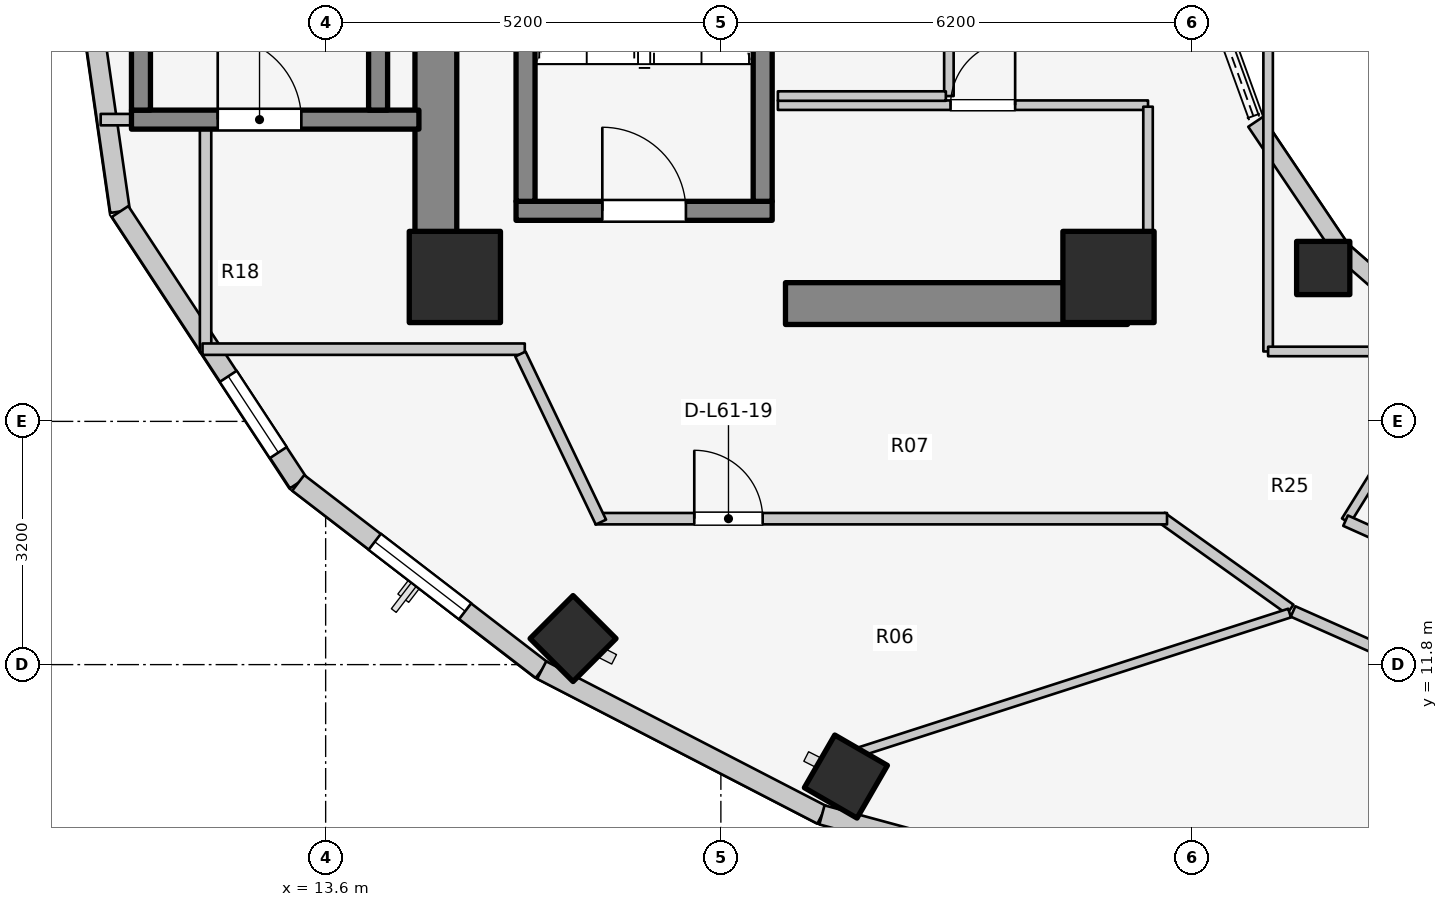
"""IFC4 building model, lengths in metres.
Left out: names, types, materials, properties, quantities, classifications, styles, units other than length and angle.
Written with IfcOpenShell. Run it as: python <this file> out.ifc"""

import sys

from ifc_helpers import new_model, si_unit, direction, frame, frame_2d, origin, origin_2d, place, context, subcontext, project, spatial, rectangle, extrude, element, fill, save


model = new_model("IFC4")
c1 = context("Model", 3, precision=1e-05, world=origin(), true_north=direction((0.0, 1.0)))
c2 = subcontext(c1, "Body", "Model", "MODEL_VIEW")
j1 = project(units=[si_unit("LENGTHUNIT", "METRE"), si_unit("PLANEANGLEUNIT", "RADIAN")], contexts=[c1])
p1 = place(None, origin())
s1 = spatial("IfcSite", under=j1, at=p1, CompositionType="ELEMENT")
p2 = place(p1, origin())
s2 = spatial("IfcBuilding", under=s1, at=p2, CompositionType="ELEMENT")
p3 = place(p2, frame((0.0, 0.0, 201.6)))
s3 = spatial("IfcBuildingStorey", under=s2, at=p3, CompositionType="ELEMENT", Elevation=201.6)
p4 = place(p3, frame((15.05, 17.05, 0.0), z_axis=(0.0, 0.0, 1.0), x_axis=(0.0, 1.0, 0.0)))
e1 = element("IfcWall", 1, at=p4, inside=s3, PredefinedType="SHEAR", context=c2, shape_type="SweptSolid", body=[
    extrude(rectangle(XDim=12.8, YDim=0.55, at=frame_2d((6.4, 0.0))), origin(), (0.0, 0.0, 1.0), 3.1),
])
p5 = place(p3, frame((19.65, 16.55, 0.0), z_axis=(0.0, 0.0, 1.0), x_axis=(1.0, 0.0, 0.0)))
e2 = element("IfcWall", 2, at=p5, inside=s3, PredefinedType="SHEAR", context=c2, shape_type="SweptSolid", body=[
    extrude(rectangle(XDim=4.5, YDim=0.55, at=frame_2d((2.25, 0.0))), origin(), (0.0, 0.0, 1.0), 3.1),
])
p6 = place(p3, frame((16.105, 17.77, 0.0), z_axis=(0.0, 0.0, 1.0), x_axis=(1.0, 0.0, 0.0)))
e3 = element("IfcWall", 3, at=p6, inside=s3, PredefinedType="SOLIDWALL", context=c2, shape_type="SweptSolid", body=[
    extrude(rectangle(XDim=3.37, YDim=0.25, at=frame_2d((1.685, 0.0))), origin(), (0.0, 0.0, 1.0), 3.1),
])
p7 = place(p6, frame((1.135, 0.0, 0.0)))
e4 = element("IfcOpeningElement", 4, at=p7, cuts=e3, PredefinedType="OPENING", context=c2, shape_type="SweptSolid", body=[
    extrude(rectangle(XDim=1.1, YDim=2.1, at=frame_2d((0.55, 1.05))), frame((0.0, 0.135, 0.0), z_axis=(0.0, -1.0, 0.0), x_axis=(1.0, 0.0, 0.0)), (0.0, 0.0, 1.0), 0.27),
])
for number, where, z_axis, x_axis in (
    (5, (16.23, 17.895, 0.0), (0.0, 0.0, 1.0), (0.0, 1.0, 0.0)),
    (6, (19.35, 17.895, 0.0), (0.0, 0.0, 1.0), (0.0, 1.0, 0.0)),
):
    element("IfcWall", number, at=place(p3, frame(where, z_axis=z_axis, x_axis=x_axis)), inside=s3, PredefinedType="SOLIDWALL", context=c2, shape_type="SweptSolid", body=[
        extrude(rectangle(XDim=7.81, YDim=0.25, at=frame_2d((3.905, 0.0))), origin(), (0.0, 0.0, 1.0), 3.1),
    ])
p8 = place(p3, frame((11.045, 18.97, 0.0), z_axis=(0.0, 0.0, 1.0), x_axis=(1.0, 0.0, 0.0)))
e7 = element("IfcWall", 7, at=p8, inside=s3, PredefinedType="SOLIDWALL", context=c2, shape_type="SweptSolid", body=[
    extrude(rectangle(XDim=3.782, YDim=0.25, at=frame_2d((1.891, 0.0))), origin(), (0.0, 0.0, 1.0), 3.1),
])
p9 = place(p8, frame((1.135, 0.0, 0.0)))
e8 = element("IfcOpeningElement", 8, at=p9, cuts=e7, PredefinedType="OPENING", context=c2, shape_type="SweptSolid", body=[
    extrude(rectangle(XDim=1.1, YDim=2.1, at=frame_2d((0.55, 1.05))), frame((0.0, 0.135, 0.0), z_axis=(0.0, -1.0, 0.0), x_axis=(1.0, 0.0, 0.0)), (0.0, 0.0, 1.0), 0.27),
])
for number, where, z_axis, x_axis in (
    (9, (11.17, 19.095, 0.0), (0.0, 0.0, 1.0), (0.0, 1.0, 0.0)),
    (10, (14.29, 19.095, 0.0), (0.0, 0.0, 1.0), (0.0, 1.0, 0.0)),
):
    element("IfcWall", number, at=place(p3, frame(where, z_axis=z_axis, x_axis=x_axis)), inside=s3, PredefinedType="SOLIDWALL", context=c2, shape_type="SweptSolid", body=[
        extrude(rectangle(XDim=7.81, YDim=0.25, at=frame_2d((3.905, 0.0))), origin(), (0.0, 0.0, 1.0), 3.1),
    ])
for number, where, z_axis, x_axis in (
    (11, (15.3, 16.9, 0.0), (0.0, 0.0, 1.0), (1.0, 0.0, 0.0)),
    (12, (23.9, 16.9, 0.0), (0.0, 0.0, 1.0), (1.0, 0.0, 0.0)),
):
    element("IfcColumn", number, at=place(p3, frame(where, z_axis=z_axis, x_axis=x_axis)), inside=s3, PredefinedType="COLUMN", context=c2, shape_type="SweptSolid", body=[
        extrude(rectangle(XDim=1.2, YDim=1.2, at=origin_2d()), origin(), (0.0, 0.0, 1.0), 3.1),
    ])
p10 = place(p3, frame((26.725, 17.018, 0.0), z_axis=(0.0, 0.0, 1.0), x_axis=(1.0, 0.0, 0.0)))
e13 = element("IfcColumn", 13, at=p10, inside=s3, PredefinedType="COLUMN", context=c2, shape_type="SweptSolid", body=[
    extrude(rectangle(XDim=0.7, YDim=0.7, at=origin_2d()), origin(), (0.0, 0.0, 1.0), 3.1),
])
for number, where, z_axis, x_axis in (
    (14, (16.855, 12.143, 0.0), (0.0, 0.0, 1.0), (-0.707, -0.707, 0.0)),
    (15, (20.445, 10.327, 0.0), (0.0, 0.0, 1.0), (-0.5, -0.866, 0.0)),
):
    element("IfcColumn", number, at=place(p3, frame(where, z_axis=z_axis, x_axis=x_axis)), inside=s3, PredefinedType="COLUMN", context=c2, shape_type="SweptSolid", body=[
        extrude(rectangle(XDim=0.8, YDim=0.8, at=origin_2d()), origin(), (0.0, 0.0, 1.0), 3.1),
    ])
p11 = place(p3, frame((25.834, 18.94, 0.0), z_axis=(0.0, 0.0, 1.0), x_axis=(0.558197800898, -0.829707909492, 0.0)))
e16 = element("IfcWall", 16, at=p11, inside=s3, PredefinedType="STANDARD", context=c2, shape_type="SweptSolid", body=[
    extrude(rectangle(XDim=2.027, YDim=0.23, at=frame_2d((1.013, 0.0))), origin(), (0.0, 0.0, 1.0), 2.16),
])
p12 = place(p3, frame((26.965, 17.258, 0.0), z_axis=(0.0, 0.0, 1.0), x_axis=(0.752576694707, -0.658504607869, 0.0)))
e17 = element("IfcWall", 17, at=p12, inside=s3, PredefinedType="STANDARD", context=c2, shape_type="SweptSolid", body=[
    extrude(rectangle(XDim=1.959, YDim=0.23, at=frame_2d((0.98, 0.0))), origin(), (0.0, 0.0, 1.0), 2.16),
])
p13 = place(p3, frame((10.14, 23.0, 0.0), z_axis=(0.0, 0.0, 1.0), x_axis=(0.142712754019, -0.989764148593, 0.0)))
e18 = element("IfcWall", 18, at=p13, inside=s3, PredefinedType="STANDARD", context=c2, shape_type="SweptSolid", body=[
    extrude(rectangle(XDim=5.293, YDim=0.26, at=frame_2d((2.646, 0.0))), origin(), (0.0, 0.0, 1.0), 2.85),
])
p14 = place(p13, frame((1.458, 0.0, 0.75)))
e19 = element("IfcOpeningElement", 19, at=p14, cuts=e18, PredefinedType="OPENING", context=c2, shape_type="SweptSolid", body=[
    extrude(rectangle(XDim=1.2, YDim=1.5, at=frame_2d((0.6, 0.75))), frame((0.0, 0.14, 0.0), z_axis=(0.0, -1.0, 0.0), x_axis=(1.0, 0.0, 0.0)), (0.0, 0.0, 1.0), 0.28),
])
p15 = place(p3, frame((10.895, 17.761, 0.0), z_axis=(0.0, 0.0, 1.0), x_axis=(0.548776305075, -0.835969238064, 0.0)))
e20 = element("IfcWall", 20, at=p15, inside=s3, PredefinedType="STANDARD", context=c2, shape_type="SweptSolid", body=[
    extrude(rectangle(XDim=4.271, YDim=0.26, at=frame_2d((2.135, 0.0))), origin(), (0.0, 0.0, 1.0), 2.85),
])
p16 = place(p15, frame((2.594, 0.0, 0.75)))
e21 = element("IfcOpeningElement", 21, at=p16, cuts=e20, PredefinedType="OPENING", context=c2, shape_type="SweptSolid", body=[
    extrude(rectangle(XDim=1.2, YDim=1.5, at=frame_2d((0.6, 0.75))), frame((0.0, 0.14, 0.0), z_axis=(0.0, -1.0, 0.0), x_axis=(1.0, 0.0, 0.0)), (0.0, 0.0, 1.0), 0.28),
])
p17 = place(p3, frame((13.239, 14.191, 0.0), z_axis=(0.0, 0.0, 1.0), x_axis=(0.792713817907, -0.609593965603, 0.0)))
e22 = element("IfcWall", 22, at=p17, inside=s3, PredefinedType="STANDARD", context=c2, shape_type="SweptSolid", body=[
    extrude(rectangle(XDim=4.041, YDim=0.26, at=frame_2d((2.021, 0.0))), origin(), (0.0, 0.0, 1.0), 2.85),
])
p18 = place(p17, frame((1.271, 0.0, 0.75)))
e23 = element("IfcOpeningElement", 23, at=p18, cuts=e22, PredefinedType="OPENING", context=c2, shape_type="SweptSolid", body=[
    extrude(rectangle(XDim=1.5, YDim=1.6, at=frame_2d((0.75, 0.8))), frame((0.0, 0.14, 0.0), z_axis=(0.0, -1.0, 0.0), x_axis=(1.0, 0.0, 0.0)), (0.0, 0.0, 1.0), 0.28),
])
p19 = place(p3, frame((16.442, 11.728, 0.0), z_axis=(0.0, 0.0, 1.0), x_axis=(0.88849146803, -0.458893137057, 0.0)))
e24 = element("IfcWall", 24, at=p19, inside=s3, PredefinedType="STANDARD", context=c2, shape_type="SweptSolid", body=[
    extrude(rectangle(XDim=4.15, YDim=0.26, at=frame_2d((2.075, 0.0))), origin(), (0.0, 0.0, 1.0), 2.85),
])
p20 = place(p3, frame((20.13, 9.823, 0.0), z_axis=(0.0, 0.0, 1.0), x_axis=(0.965213026382, -0.261464746576, 0.0)))
e25 = element("IfcWall", 25, at=p20, inside=s3, PredefinedType="STANDARD", context=c2, shape_type="SweptSolid", body=[
    extrude(rectangle(XDim=5.001, YDim=0.26, at=frame_2d((2.5, 0.0))), origin(), (0.0, 0.0, 1.0), 2.85),
])
p21 = place(p20, frame((1.75, 0.0, 0.75)))
e26 = element("IfcOpeningElement", 26, at=p21, cuts=e25, PredefinedType="OPENING", context=c2, shape_type="SweptSolid", body=[
    extrude(rectangle(XDim=1.5, YDim=1.6, at=frame_2d((0.75, 0.8))), frame((0.0, 0.14, 0.0), z_axis=(0.0, -1.0, 0.0), x_axis=(1.0, 0.0, 0.0)), (0.0, 0.0, 1.0), 0.28),
])
p22 = place(p3, frame((19.55, 19.16, 0.0), z_axis=(0.0, 0.0, 1.0), x_axis=(1.0, 0.0, 0.0)))
e27 = element("IfcWall", 27, at=p22, inside=s3, PredefinedType="PARTITIONING", context=c2, shape_type="SweptSolid", body=[
    extrude(rectangle(XDim=4.87, YDim=0.125, at=frame_2d((2.435, 0.0))), origin(), (0.0, 0.0, 1.0), 2.12),
])
p23 = place(p22, frame((2.272, 0.0, 0.0)))
e28 = element("IfcOpeningElement", 28, at=p23, cuts=e27, PredefinedType="OPENING", context=c2, shape_type="SweptSolid", body=[
    extrude(rectangle(XDim=0.85, YDim=2.05, at=frame_2d((0.425, 1.025))), frame((0.0, 0.073, 0.0), z_axis=(0.0, -1.0, 0.0), x_axis=(1.0, 0.0, 0.0)), (0.0, 0.0, 1.0), 0.145),
])
p24 = place(p3, frame((24.42, 17.1, 0.0), z_axis=(0.0, 0.0, 1.0), x_axis=(0.0, 1.0, 0.0)))
e29 = element("IfcWall", 29, at=p24, inside=s3, PredefinedType="PARTITIONING", context=c2, shape_type="SweptSolid", body=[
    extrude(rectangle(XDim=2.04, YDim=0.125, at=frame_2d((1.02, 0.0))), origin(), (0.0, 0.0, 1.0), 2.232),
])
p25 = place(p3, frame((21.8, 19.28, 0.0), z_axis=(0.0, 0.0, 1.0), x_axis=(0.0, 1.0, 0.0)))
e30 = element("IfcWall", 30, at=p25, inside=s3, PredefinedType="PARTITIONING", context=c2, shape_type="SweptSolid", body=[
    extrude(rectangle(XDim=2.4, YDim=0.125, at=frame_2d((1.2, 0.0))), origin(), (0.0, 0.0, 1.0), 2.855),
])
p26 = place(p25, frame((0.7, 0.0, 0.0)))
e31 = element("IfcOpeningElement", 31, at=p26, cuts=e30, PredefinedType="OPENING", context=c2, shape_type="SweptSolid", body=[
    extrude(rectangle(XDim=0.85, YDim=2.05, at=frame_2d((0.425, 1.025))), frame((0.0, 0.073, 0.0), z_axis=(0.0, -1.0, 0.0), x_axis=(1.0, 0.0, 0.0)), (0.0, 0.0, 1.0), 0.145),
])
p27 = place(p3, frame((19.55, 19.28, 0.0), z_axis=(0.0, 0.0, 1.0), x_axis=(1.0, 0.0, 0.0)))
e32 = element("IfcWall", 32, at=p27, inside=s3, PredefinedType="PARTITIONING", context=c2, shape_type="SweptSolid", body=[
    extrude(rectangle(XDim=2.21, YDim=0.125, at=frame_2d((1.105, 0.0))), origin(), (0.0, 0.0, 1.0), 2.12),
])
p28 = place(p3, frame((28.45, 15.985, 0.0), z_axis=(0.0, 0.0, 1.0), x_axis=(-0.527527080983, -0.849538215049, 0.0)))
e33 = element("IfcWall", 33, at=p28, inside=s3, PredefinedType="PARTITIONING", context=c2, shape_type="SweptSolid", body=[
    extrude(rectangle(XDim=2.701, YDim=0.125, at=frame_2d((1.351, 0.0))), origin(), (0.0, 0.0, 1.0), 2.376),
])
p29 = place(p3, frame((27.019, 13.694, 0.0), z_axis=(0.0, 0.0, 1.0), x_axis=(0.912628408652, -0.408790151203, 0.0)))
e34 = element("IfcWall", 34, at=p29, inside=s3, PredefinedType="PARTITIONING", context=c2, shape_type="SweptSolid", body=[
    extrude(rectangle(XDim=2.638, YDim=0.15, at=frame_2d((1.319, 0.0))), origin(), (0.0, 0.0, 1.0), 2.376),
])
p30 = place(p3, frame((26.0, 15.92, 0.0), z_axis=(0.0, 0.0, 1.0), x_axis=(0.0, 1.0, 0.0)))
e35 = element("IfcWall", 35, at=p30, inside=s3, PredefinedType="PARTITIONING", context=c2, shape_type="SweptSolid", body=[
    extrude(rectangle(XDim=4.28, YDim=0.125, at=frame_2d((2.14, 0.0))), origin(), (0.0, 0.0, 1.0), 2.232),
])
p31 = place(p3, frame((26.0, 15.92, 0.0), z_axis=(0.0, 0.0, 1.0), x_axis=(1.0, 0.0, 0.0)))
e36 = element("IfcWall", 36, at=p31, inside=s3, PredefinedType="PARTITIONING", context=c2, shape_type="SweptSolid", body=[
    extrude(rectangle(XDim=2.6, YDim=0.125, at=frame_2d((1.3, 0.0))), origin(), (0.0, 0.0, 1.0), 2.232),
])
p32 = place(p3, frame((10.64, 18.97, 0.0), z_axis=(0.0, 0.0, 1.0), x_axis=(1.0, 0.0, 0.0)))
e37 = element("IfcWall", 37, at=p32, inside=s3, PredefinedType="PARTITIONING", context=c2, shape_type="SweptSolid", body=[
    extrude(rectangle(XDim=0.4, YDim=0.15, at=frame_2d((0.2, 0.0))), origin(), (0.0, 0.0, 1.0), 2.855),
])
p33 = place(p3, frame((12.02, 15.91, 0.0), z_axis=(0.0, 0.0, 1.0), x_axis=(0.0, 1.0, 0.0)))
e38 = element("IfcWall", 38, at=p33, inside=s3, PredefinedType="PARTITIONING", context=c2, shape_type="SweptSolid", body=[
    extrude(rectangle(XDim=2.93, YDim=0.15, at=frame_2d((1.465, 0.0))), origin(), (0.0, 0.0, 1.0), 2.855),
])
p34 = place(p3, frame((11.98, 15.95, 0.0), z_axis=(0.0, 0.0, 1.0), x_axis=(1.0, 0.0, 0.0)))
e39 = element("IfcWall", 39, at=p34, inside=s3, PredefinedType="PARTITIONING", context=c2, shape_type="SweptSolid", body=[
    extrude(rectangle(XDim=4.24, YDim=0.15, at=frame_2d((2.12, 0.0))), origin(), (0.0, 0.0, 1.0), 2.22),
])
p35 = place(p3, frame((26.29, 12.527, 0.0), z_axis=(0.0, 0.0, 1.0), x_axis=(-0.813780999276, 0.581171648669, 0.0)))
e40 = element("IfcWall", 40, at=p35, inside=s3, PredefinedType="PARTITIONING", context=c2, shape_type="SweptSolid", body=[
    extrude(rectangle(XDim=2.082, YDim=0.15, at=frame_2d((1.041, 0.0))), origin(), (0.0, 0.0, 1.0), 2.376),
])
p36 = place(p3, frame((17.15, 13.72, 0.0), z_axis=(0.0, 0.0, 1.0), x_axis=(1.0, 0.0, 0.0)))
e41 = element("IfcWall", 41, at=p36, inside=s3, PredefinedType="PARTITIONING", context=c2, shape_type="SweptSolid", body=[
    extrude(rectangle(XDim=7.52, YDim=0.15, at=frame_2d((3.76, 0.0))), origin(), (0.0, 0.0, 1.0), 2.376),
])
p37 = place(p36, frame((1.3, 0.0, 0.0)))
e42 = element("IfcOpeningElement", 42, at=p37, cuts=e41, PredefinedType="OPENING", context=c2, shape_type="SweptSolid", body=[
    extrude(rectangle(XDim=0.9, YDim=2.1, at=frame_2d((0.45, 1.05))), frame((0.0, 0.085, 0.0), z_axis=(0.0, -1.0, 0.0), x_axis=(1.0, 0.0, 0.0)), (0.0, 0.0, 1.0), 0.17),
])
p38 = place(p3, frame((17.222, 13.675, 0.0), z_axis=(0.0, 0.0, 1.0), x_axis=(-0.431973389813, 0.901886351207, 0.0)))
e43 = element("IfcWall", 43, at=p38, inside=s3, PredefinedType="PARTITIONING", context=c2, shape_type="SweptSolid", body=[
    extrude(rectangle(XDim=2.452, YDim=0.15, at=frame_2d((1.226, 0.0))), origin(), (0.0, 0.0, 1.0), 2.855),
])
p39 = place(p3, frame((26.283, 12.478, 0.0), z_axis=(0.0, 0.0, 1.0), x_axis=(-0.951711719757, -0.306993163568, 0.0)))
e44 = element("IfcWall", 44, at=p39, inside=s3, PredefinedType="MOVABLE", context=c2, shape_type="SweptSolid", body=[
    extrude(rectangle(XDim=5.934, YDim=0.12, at=frame_2d((2.967, 0.0))), origin(), (0.0, 0.0, 1.0), 2.376),
])
p40 = place(p3, frame((26.328, 12.499, 0.0), z_axis=(0.0, 0.0, 1.0), x_axis=(0.914043013008, -0.4056172708, 0.0)))
e45 = element("IfcWall", 45, at=p40, inside=s3, PredefinedType="PARTITIONING", context=c2, shape_type="SweptSolid", body=[
    extrude(rectangle(XDim=2.999, YDim=0.15, at=frame_2d((1.5, 0.0))), origin(), (0.0, 0.0, 1.0), 2.376),
])
p41 = place(p16, origin())
e46 = element("IfcWindow", 46, at=p41, inside=s3, PartitioningType="SINGLE_PANEL", PredefinedType="WINDOW", context=c2, shape_type="SweptSolid", body=[
    extrude(rectangle(XDim=1.2, YDim=1.5, at=frame_2d((0.6, 0.75))), frame((0.0, 0.03, 0.0), z_axis=(0.0, -1.0, 0.0), x_axis=(1.0, 0.0, 0.0)), (0.0, 0.0, 1.0), 0.06),
])
fill(e21, e46)
p42 = place(p18, origin())
e47 = element("IfcWindow", 47, at=p42, inside=s3, PartitioningType="SINGLE_PANEL", PredefinedType="WINDOW", context=c2, shape_type="SweptSolid", body=[
    extrude(rectangle(XDim=1.5, YDim=1.6, at=frame_2d((0.75, 0.8))), frame((0.0, 0.03, 0.0), z_axis=(0.0, -1.0, 0.0), x_axis=(1.0, 0.0, 0.0)), (0.0, 0.0, 1.0), 0.06),
])
fill(e23, e47)
p43 = place(p7, origin())
e48 = element("IfcDoor", 48, at=p43, inside=s3, OperationType="SINGLE_SWING_LEFT", PredefinedType="DOOR", context=c2, shape_type="SweptSolid", body=[
    extrude(rectangle(XDim=1.1, YDim=2.1, at=frame_2d((0.55, 1.05))), frame((0.0, 0.025, 0.0), z_axis=(0.0, -1.0, 0.0), x_axis=(1.0, 0.0, 0.0)), (0.0, 0.0, 1.0), 0.05),
])
fill(e4, e48)
p44 = place(p9, origin())
e49 = element("IfcDoor", 49, at=p44, inside=s3, OperationType="SINGLE_SWING_LEFT", PredefinedType="DOOR", context=c2, shape_type="SweptSolid", body=[
    extrude(rectangle(XDim=1.1, YDim=2.1, at=frame_2d((0.55, 1.05))), frame((0.0, 0.025, 0.0), z_axis=(0.0, -1.0, 0.0), x_axis=(1.0, 0.0, 0.0)), (0.0, 0.0, 1.0), 0.05),
])
fill(e8, e49)
p45 = place(p23, origin())
e50 = element("IfcDoor", 50, at=p45, inside=s3, OperationType="SINGLE_SWING_RIGHT", PredefinedType="DOOR", context=c2, shape_type="SweptSolid", body=[
    extrude(rectangle(XDim=0.85, YDim=2.05, at=frame_2d((0.425, 1.025))), frame((0.0, 0.025, 0.0), z_axis=(0.0, -1.0, 0.0), x_axis=(1.0, 0.0, 0.0)), (0.0, 0.0, 1.0), 0.05),
])
fill(e28, e50)
p46 = place(p37, origin())
e51 = element("IfcDoor", 51, at=p46, inside=s3, OperationType="SINGLE_SWING_LEFT", PredefinedType="DOOR", context=c2, shape_type="SweptSolid", body=[
    extrude(rectangle(XDim=0.9, YDim=2.1, at=frame_2d((0.45, 1.05))), frame((0.0, 0.025, 0.0), z_axis=(0.0, -1.0, 0.0), x_axis=(1.0, 0.0, 0.0)), (0.0, 0.0, 1.0), 0.05),
])
fill(e42, e51)
save(model, sys.argv[1])
